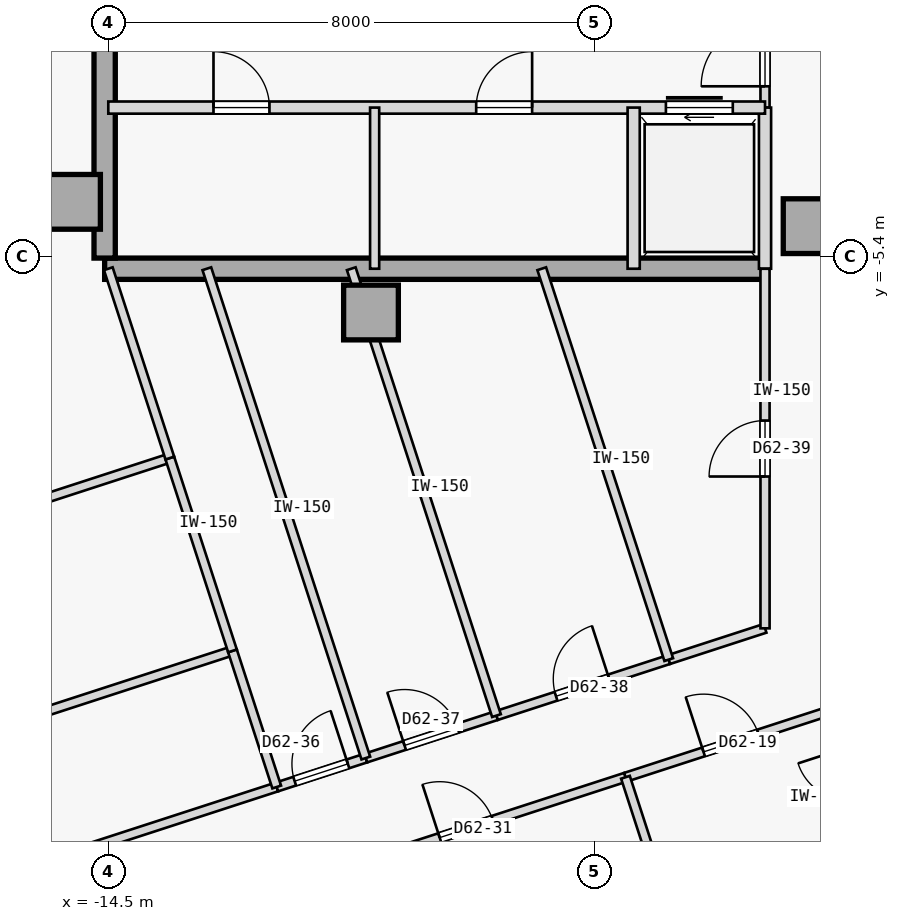
"""IFC4 building model, lengths in metres.
Left out: names, types, materials, properties, quantities, classifications, styles, units other than length and angle.
Written with IfcOpenShell. Run it as: python <this file> out.ifc"""

import sys

from ifc_helpers import new_model, si_unit, direction, frame, frame_2d, origin, origin_2d, place, context, subcontext, project, spatial, rectangle, extrude, element, fill, save


model = new_model("IFC4")
c1 = context("Model", 3, precision=1e-05, world=origin(), true_north=direction((0.0, 1.0)))
c2 = subcontext(c1, "Body", "Model", "MODEL_VIEW")
j1 = project(units=[si_unit("LENGTHUNIT", "METRE"), si_unit("PLANEANGLEUNIT", "RADIAN")], contexts=[c1])
p1 = place(None, origin())
s1 = spatial("IfcSite", under=j1, at=p1, CompositionType="ELEMENT")
p2 = place(p1, origin())
s2 = spatial("IfcBuilding", under=s1, at=p2, CompositionType="ELEMENT")
p3 = place(p2, frame((0.0, 0.0, 234.35)))
s3 = spatial("IfcBuildingStorey", under=s2, at=p3, CompositionType="ELEMENT", Elevation=234.35)
for number, where, z_axis, x_axis in (
    (1, (-15.08, -4.5, 0.0), (0.0, 0.0, 1.0), (1.0, 0.0, 0.0)),
    (2, (-10.18, -6.32, 0.0), (0.0, 0.0, 1.0), (1.0, 0.0, 0.0)),
    (3, (-2.95, -4.9, 0.0), (0.0, 0.0, 1.0), (1.0, 0.0, 0.0)),
):
    element("IfcColumn", number, at=place(p3, frame(where, z_axis=z_axis, x_axis=x_axis)), inside=s3, PredefinedType="COLUMN", context=c2, shape_type="SweptSolid", body=[
        extrude(rectangle(XDim=0.9, YDim=0.9, at=origin_2d()), origin(), (0.0, 0.0, 1.0), 3.35),
    ])
p4 = place(p3, frame((-14.56, -5.6, 0.0), z_axis=(0.0, 0.0, 1.0), x_axis=(1.0, 0.0, 0.0)))
e4 = element("IfcWall", 4, at=p4, inside=s3, PredefinedType="SHEAR", context=c2, shape_type="SweptSolid", body=[
    extrude(rectangle(XDim=10.86, YDim=0.35, at=frame_2d((5.43, 0.0))), origin(), (0.0, 0.0, 1.0), 3.125),
])
p5 = place(p3, frame((-14.56, -5.425, 0.0), z_axis=(0.0, 0.0, 1.0), x_axis=(0.0, 1.0, 0.0)))
e5 = element("IfcWall", 5, at=p5, inside=s3, PredefinedType="SHEAR", context=c2, shape_type="SweptSolid", body=[
    extrude(rectangle(XDim=10.85, YDim=0.35, at=frame_2d((5.425, 0.0))), origin(), (0.0, 0.0, 1.0), 3.125),
])
p6 = place(p3, frame((-3.7, -2.95, 0.0), z_axis=(0.0, 0.0, 1.0), x_axis=(0.0, 1.0, 0.0)))
e6 = element("IfcWall", 6, at=p6, inside=s3, PredefinedType="PARTITIONING", context=c2, shape_type="SweptSolid", body=[
    extrude(rectangle(XDim=1.8, YDim=0.15, at=frame_2d((0.9, 0.0))), origin(), (0.0, 0.0, 1.0), 3.125),
])
p7 = place(p6, frame((0.35, 0.0, 0.0)))
e7 = element("IfcOpeningElement", 7, at=p7, cuts=e6, PredefinedType="OPENING", context=c2, shape_type="SweptSolid", body=[
    extrude(rectangle(XDim=1.05, YDim=2.18, at=frame_2d((0.525, 1.09))), frame((0.0, 0.085, 0.0), z_axis=(0.0, -1.0, 0.0), x_axis=(1.0, 0.0, 0.0)), (0.0, 0.0, 1.0), 0.17),
])
p8 = place(p3, frame((-3.7, -5.6, 0.0), z_axis=(0.0, 0.0, 1.0), x_axis=(0.0, 1.0, 0.0)))
e8 = element("IfcWall", 8, at=p8, inside=s3, PredefinedType="STANDARD", context=c2, shape_type="SweptSolid", body=[
    extrude(rectangle(XDim=2.65, YDim=0.2, at=frame_2d((1.325, 0.0))), origin(), (0.0, 0.0, 1.0), 3.125),
])
p9 = place(p3, frame((-14.5, -2.95, 0.0), z_axis=(0.0, 0.0, 1.0), x_axis=(1.0, 0.0, 0.0)))
e9 = element("IfcWall", 9, at=p9, inside=s3, PredefinedType="STANDARD", context=c2, shape_type="SweptSolid", body=[
    extrude(rectangle(XDim=10.8, YDim=0.2, at=frame_2d((5.4, 0.0))), origin(), (0.0, 0.0, 1.0), 3.125),
])
p10 = place(p9, frame((9.17, 0.0, 0.0)))
e10 = element("IfcOpeningElement", 10, at=p10, cuts=e9, PredefinedType="OPENING", context=c2, shape_type="SweptSolid", body=[
    extrude(rectangle(XDim=1.1, YDim=2.15, at=frame_2d((0.55, 1.075))), frame((0.0, 0.11, 0.0), z_axis=(0.0, -1.0, 0.0), x_axis=(1.0, 0.0, 0.0)), (0.0, 0.0, 1.0), 0.22),
])
p11 = place(p9, frame((1.73, 0.0, 0.0)))
e11 = element("IfcOpeningElement", 11, at=p11, cuts=e9, PredefinedType="OPENING", context=c2, shape_type="SweptSolid", body=[
    extrude(rectangle(XDim=0.92, YDim=2.15, at=frame_2d((0.46, 1.075))), frame((0.0, 0.11, 0.0), z_axis=(0.0, -1.0, 0.0), x_axis=(1.0, 0.0, 0.0)), (0.0, 0.0, 1.0), 0.22),
])
p12 = place(p9, frame((6.05, 0.0, 0.0)))
e12 = element("IfcOpeningElement", 12, at=p12, cuts=e9, PredefinedType="OPENING", context=c2, shape_type="SweptSolid", body=[
    extrude(rectangle(XDim=0.92, YDim=2.15, at=frame_2d((0.46, 1.075))), frame((0.0, 0.11, 0.0), z_axis=(0.0, -1.0, 0.0), x_axis=(1.0, 0.0, 0.0)), (0.0, 0.0, 1.0), 0.22),
])
p13 = place(p3, frame((-5.86, -5.6, 0.0), z_axis=(0.0, 0.0, 1.0), x_axis=(0.0, 1.0, 0.0)))
e13 = element("IfcWall", 13, at=p13, inside=s3, PredefinedType="STANDARD", context=c2, shape_type="SweptSolid", body=[
    extrude(rectangle(XDim=2.65, YDim=0.2, at=frame_2d((1.325, 0.0))), origin(), (0.0, 0.0, 1.0), 3.125),
])
p14 = place(p3, frame((-10.12, -5.6, 0.0), z_axis=(0.0, 0.0, 1.0), x_axis=(0.0, 1.0, 0.0)))
e14 = element("IfcWall", 14, at=p14, inside=s3, PredefinedType="PARTITIONING", context=c2, shape_type="SweptSolid", body=[
    extrude(rectangle(XDim=2.65, YDim=0.15, at=frame_2d((1.325, 0.0))), origin(), (0.0, 0.0, 1.0), 3.125),
])
p15 = place(p3, frame((-5.995, -13.963, 0.0), z_axis=(0.0, 0.0, 1.0), x_axis=(0.951050780541, 0.309034646652, 0.0)))
e15 = element("IfcWall", 15, at=p15, inside=s3, PredefinedType="PARTITIONING", context=c2, shape_type="SweptSolid", body=[
    extrude(rectangle(XDim=3.65, YDim=0.15, at=frame_2d((1.825, 0.0))), origin(), (0.0, 0.0, 1.0), 3.125),
])
p16 = place(p15, frame((1.35, 0.0, 0.0)))
e16 = element("IfcOpeningElement", 16, at=p16, cuts=e15, PredefinedType="OPENING", context=c2, shape_type="SweptSolid", body=[
    extrude(rectangle(XDim=0.95, YDim=2.15, at=frame_2d((0.475, 1.075))), frame((0.0, 0.085, 0.0), z_axis=(0.0, -1.0, 0.0), x_axis=(1.0, 0.0, 0.0)), (0.0, 0.0, 1.0), 0.17),
])
p17 = place(p3, frame((-29.45, -19.881, 0.0), z_axis=(0.0, 0.0, 1.0), x_axis=(0.95105650271, 0.309017036186, 0.0)))
e17 = element("IfcWall", 17, at=p17, inside=s3, PredefinedType="PARTITIONING", context=c2, shape_type="SweptSolid", body=[
    extrude(rectangle(XDim=18.632, YDim=0.15, at=frame_2d((9.316, 0.0))), origin(), (0.0, 0.0, 1.0), 3.125),
])
p18 = place(p17, frame((8.856, 0.0, 0.0)))
e18 = element("IfcOpeningElement", 18, at=p18, cuts=e17, PredefinedType="OPENING", context=c2, shape_type="SweptSolid", body=[
    extrude(rectangle(XDim=0.92, YDim=2.15, at=frame_2d((0.46, 1.075))), frame((0.0, 0.085, 0.0), z_axis=(0.0, -1.0, 0.0), x_axis=(1.0, 0.0, 0.0)), (0.0, 0.0, 1.0), 0.17),
])
p19 = place(p3, frame((-11.23, -15.664, 0.0), z_axis=(0.0, 0.0, 1.0), x_axis=(0.951055579382, 0.309019877882, 0.0)))
e19 = element("IfcWall", 19, at=p19, inside=s3, PredefinedType="PARTITIONING", context=c2, shape_type="SweptSolid", body=[
    extrude(rectangle(XDim=5.504, YDim=0.15, at=frame_2d((2.752, 0.0))), origin(), (0.0, 0.0, 1.0), 3.125),
])
p20 = place(p19, frame((2.292, 0.0, 0.0)))
e20 = element("IfcOpeningElement", 20, at=p20, cuts=e19, PredefinedType="OPENING", context=c2, shape_type="SweptSolid", body=[
    extrude(rectangle(XDim=0.92, YDim=2.15, at=frame_2d((0.46, 1.075))), frame((0.0, 0.085, 0.0), z_axis=(0.0, -1.0, 0.0), x_axis=(1.0, 0.0, 0.0)), (0.0, 0.0, 1.0), 0.17),
])
p21 = place(p3, frame((-11.73, -14.123, 0.0), z_axis=(0.0, 0.0, 1.0), x_axis=(0.951032904484, 0.309089654614, 0.0)))
e21 = element("IfcWall", 21, at=p21, inside=s3, PredefinedType="PARTITIONING", context=c2, shape_type="SweptSolid", body=[
    extrude(rectangle(XDim=1.541, YDim=0.15, at=frame_2d((0.771, 0.0))), origin(), (0.0, 0.0, 1.0), 3.125),
])
p22 = place(p21, frame((0.311, 0.0, 0.0)))
e22 = element("IfcOpeningElement", 22, at=p22, cuts=e21, PredefinedType="OPENING", context=c2, shape_type="SweptSolid", body=[
    extrude(rectangle(XDim=0.92, YDim=2.15, at=frame_2d((0.46, 1.075))), frame((0.0, 0.085, 0.0), z_axis=(0.0, -1.0, 0.0), x_axis=(1.0, 0.0, 0.0)), (0.0, 0.0, 1.0), 0.17),
])
p23 = place(p3, frame((-10.265, -13.647, 0.0), z_axis=(0.0, 0.0, 1.0), x_axis=(0.951065832698, 0.308988319964, 0.0)))
e23 = element("IfcWall", 23, at=p23, inside=s3, PredefinedType="PARTITIONING", context=c2, shape_type="SweptSolid", body=[
    extrude(rectangle(XDim=2.259, YDim=0.15, at=frame_2d((1.129, 0.0))), origin(), (0.0, 0.0, 1.0), 3.125),
])
p24 = place(p23, frame((0.669, 0.0, 0.0)))
e24 = element("IfcOpeningElement", 24, at=p24, cuts=e23, PredefinedType="OPENING", context=c2, shape_type="SweptSolid", body=[
    extrude(rectangle(XDim=0.92, YDim=2.15, at=frame_2d((0.46, 1.075))), frame((0.0, 0.085, 0.0), z_axis=(0.0, -1.0, 0.0), x_axis=(1.0, 0.0, 0.0)), (0.0, 0.0, 1.0), 0.17),
])
p25 = place(p3, frame((-8.116, -12.949, 0.0), z_axis=(0.0, 0.0, 1.0), x_axis=(0.95107320803, 0.308965617775, 0.0)))
e25 = element("IfcWall", 25, at=p25, inside=s3, PredefinedType="PARTITIONING", context=c2, shape_type="SweptSolid", body=[
    extrude(rectangle(XDim=2.979, YDim=0.15, at=frame_2d((1.49, 0.0))), origin(), (0.0, 0.0, 1.0), 3.125),
])
p26 = place(p25, frame((1.03, 0.0, 0.0)))
e26 = element("IfcOpeningElement", 26, at=p26, cuts=e25, PredefinedType="OPENING", context=c2, shape_type="SweptSolid", body=[
    extrude(rectangle(XDim=0.92, YDim=2.15, at=frame_2d((0.46, 1.075))), frame((0.0, 0.085, 0.0), z_axis=(0.0, -1.0, 0.0), x_axis=(1.0, 0.0, 0.0)), (0.0, 0.0, 1.0), 0.17),
])
p27 = place(p3, frame((-5.283, -12.028, 0.0), z_axis=(0.0, 0.0, 1.0), x_axis=(0.951031913627, 0.309092703349, 0.0)))
e27 = element("IfcWall", 27, at=p27, inside=s3, PredefinedType="PARTITIONING", context=c2, shape_type="SweptSolid", body=[
    extrude(rectangle(XDim=1.665, YDim=0.15, at=frame_2d((0.833, 0.0))), origin(), (0.0, 0.0, 1.0), 3.125),
])
p28 = place(p3, frame((-3.7, -11.514, 0.0), z_axis=(0.0, 0.0, 1.0), x_axis=(-8.2572974e-05, 0.999999996591, 0.0)))
e28 = element("IfcWall", 28, at=p28, inside=s3, PredefinedType="PARTITIONING", context=c2, shape_type="SweptSolid", body=[
    extrude(rectangle(XDim=5.913, YDim=0.15, at=frame_2d((2.957, 0.0))), origin(), (0.0, 0.0, 1.0), 3.125),
])
p29 = place(p28, frame((2.497, 0.0, 0.0)))
e29 = element("IfcOpeningElement", 29, at=p29, cuts=e28, PredefinedType="OPENING", context=c2, shape_type="SweptSolid", body=[
    extrude(rectangle(XDim=0.92, YDim=2.15, at=frame_2d((0.46, 1.075))), frame((0.0, 0.085, 0.0), z_axis=(0.0, -1.0, 0.0), x_axis=(1.0, 0.0, 0.0)), (0.0, 0.0, 1.0), 0.17),
])
p30 = place(p3, frame((-4.972, -17.113, 0.0), z_axis=(0.0, 0.0, 1.0), x_axis=(-0.309009398695, 0.951058984248, 0.0)))
e30 = element("IfcWall", 30, at=p30, inside=s3, PredefinedType="PARTITIONING", context=c2, shape_type="SweptSolid", body=[
    extrude(rectangle(XDim=3.312, YDim=0.15, at=frame_2d((1.656, 0.0))), origin(), (0.0, 0.0, 1.0), 3.125),
])
p31 = place(p3, frame((-30.178, -17.642, 0.0), z_axis=(0.0, 0.0, 1.0), x_axis=(0.95105650271, 0.309017036186, 0.0)))
e31 = element("IfcWall", 31, at=p31, inside=s3, PredefinedType="PARTITIONING", context=c2, shape_type="SweptSolid", body=[
    extrude(rectangle(XDim=18.632, YDim=0.15, at=frame_2d((9.316, 0.0))), origin(), (0.0, 0.0, 1.0), 3.125),
])
p32 = place(p31, frame((8.856, 0.0, 0.0)))
e32 = element("IfcOpeningElement", 32, at=p32, cuts=e31, PredefinedType="OPENING", context=c2, shape_type="SweptSolid", body=[
    extrude(rectangle(XDim=0.92, YDim=2.15, at=frame_2d((0.46, 1.075))), frame((0.0, 0.085, 0.0), z_axis=(0.0, -1.0, 0.0), x_axis=(1.0, 0.0, 0.0)), (0.0, 0.0, 1.0), 0.17),
])
p33 = place(p3, frame((-11.73, -14.123, 0.0), z_axis=(0.0, 0.0, 1.0), x_axis=(-0.309062621189, 0.951041690035, 0.0)))
e33 = element("IfcWall", 33, at=p33, inside=s3, PredefinedType="PARTITIONING", context=c2, shape_type="SweptSolid", body=[
    extrude(rectangle(XDim=2.354, YDim=0.15, at=frame_2d((1.177, 0.0))), origin(), (0.0, 0.0, 1.0), 3.125),
])
p34 = place(p3, frame((-31.208, -14.471, 0.0), z_axis=(0.0, 0.0, 1.0), x_axis=(0.951057753948, 0.309013185244, 0.0)))
e34 = element("IfcWall", 34, at=p34, inside=s3, PredefinedType="PARTITIONING", context=c2, shape_type="SweptSolid", body=[
    extrude(rectangle(XDim=18.632, YDim=0.15, at=frame_2d((9.316, 0.0))), origin(), (0.0, 0.0, 1.0), 3.125),
])
p35 = place(p3, frame((-12.458, -11.884, 0.0), z_axis=(0.0, 0.0, 1.0), x_axis=(-0.308946982245, 0.951079261766, 0.0)))
e35 = element("IfcWall", 35, at=p35, inside=s3, PredefinedType="PARTITIONING", context=c2, shape_type="SweptSolid", body=[
    extrude(rectangle(XDim=3.334, YDim=0.15, at=frame_2d((1.667, 0.0))), origin(), (0.0, 0.0, 1.0), 3.125),
])
p36 = place(p3, frame((-30.663, -9.757, 0.0), z_axis=(0.0, 0.0, 1.0), x_axis=(0.951058192995, 0.309011833974, 0.0)))
e36 = element("IfcWall", 36, at=p36, inside=s3, PredefinedType="PARTITIONING", context=c2, shape_type="SweptSolid", body=[
    extrude(rectangle(XDim=16.657, YDim=0.15, at=frame_2d((8.329, 0.0))), origin(), (0.0, 0.0, 1.0), 3.125),
])
p37 = place(p3, frame((-13.488, -8.713, 0.0), z_axis=(0.0, 0.0, 1.0), x_axis=(-0.309082700143, 0.951035164687, 0.0)))
e37 = element("IfcWall", 37, at=p37, inside=s3, PredefinedType="PARTITIONING", context=c2, shape_type="SweptSolid", body=[
    extrude(rectangle(XDim=3.274, YDim=0.15, at=frame_2d((1.637, 0.0))), origin(), (0.0, 0.0, 1.0), 3.125),
])
p38 = place(p3, frame((-10.265, -13.647, 0.0), z_axis=(0.0, 0.0, 1.0), x_axis=(-0.309007776314, 0.951059511375, 0.0)))
e38 = element("IfcWall", 38, at=p38, inside=s3, PredefinedType="PARTITIONING", context=c2, shape_type="SweptSolid", body=[
    extrude(rectangle(XDim=8.461, YDim=0.15, at=frame_2d((4.23, 0.0))), origin(), (0.0, 0.0, 1.0), 3.125),
])
p39 = place(p3, frame((-8.116, -12.949, 0.0), z_axis=(0.0, 0.0, 1.0), x_axis=(-0.309005340707, 0.951060302722, 0.0)))
e39 = element("IfcWall", 39, at=p39, inside=s3, PredefinedType="PARTITIONING", context=c2, shape_type="SweptSolid", body=[
    extrude(rectangle(XDim=7.727, YDim=0.15, at=frame_2d((3.864, 0.0))), origin(), (0.0, 0.0, 1.0), 3.125),
])
p40 = place(p3, frame((-5.283, -12.028, 0.0), z_axis=(0.0, 0.0, 1.0), x_axis=(-0.30901256406, 0.95105795578, 0.0)))
e40 = element("IfcWall", 40, at=p40, inside=s3, PredefinedType="PARTITIONING", context=c2, shape_type="SweptSolid", body=[
    extrude(rectangle(XDim=6.759, YDim=0.15, at=frame_2d((3.379, 0.0))), origin(), (0.0, 0.0, 1.0), 3.125),
])
p41 = place(p7, origin())
e41 = element("IfcDoor", 41, at=p41, inside=s3, OperationType="SINGLE_SWING_LEFT", PredefinedType="DOOR", context=c2, shape_type="SweptSolid", body=[
    extrude(rectangle(XDim=1.05, YDim=2.18, at=frame_2d((0.525, 1.09))), frame((0.0, 0.025, 0.0), z_axis=(0.0, -1.0, 0.0), x_axis=(1.0, 0.0, 0.0)), (0.0, 0.0, 1.0), 0.05),
])
fill(e7, e41)
p42 = place(p10, origin())
e42 = element("IfcDoor", 42, at=p42, inside=s3, OperationType="SLIDING_TO_RIGHT", PredefinedType="DOOR", context=c2, shape_type="SweptSolid", body=[
    extrude(rectangle(XDim=1.1, YDim=2.15, at=frame_2d((0.55, 1.075))), frame((0.0, 0.025, 0.0), z_axis=(0.0, -1.0, 0.0), x_axis=(1.0, 0.0, 0.0)), (0.0, 0.0, 1.0), 0.05),
])
fill(e10, e42)
p43 = place(p11, origin())
e43 = element("IfcDoor", 43, at=p43, inside=s3, OperationType="SINGLE_SWING_LEFT", PredefinedType="DOOR", context=c2, shape_type="SweptSolid", body=[
    extrude(rectangle(XDim=0.92, YDim=2.15, at=frame_2d((0.46, 1.075))), frame((0.0, 0.025, 0.0), z_axis=(0.0, -1.0, 0.0), x_axis=(1.0, 0.0, 0.0)), (0.0, 0.0, 1.0), 0.05),
])
fill(e11, e43)
p44 = place(p12, origin())
e44 = element("IfcDoor", 44, at=p44, inside=s3, OperationType="SINGLE_SWING_RIGHT", PredefinedType="DOOR", context=c2, shape_type="SweptSolid", body=[
    extrude(rectangle(XDim=0.92, YDim=2.15, at=frame_2d((0.46, 1.075))), frame((0.0, 0.025, 0.0), z_axis=(0.0, -1.0, 0.0), x_axis=(1.0, 0.0, 0.0)), (0.0, 0.0, 1.0), 0.05),
])
fill(e12, e44)
p45 = place(p16, origin())
e45 = element("IfcDoor", 45, at=p45, inside=s3, OperationType="SINGLE_SWING_LEFT", PredefinedType="DOOR", context=c2, shape_type="SweptSolid", body=[
    extrude(rectangle(XDim=0.95, YDim=2.15, at=frame_2d((0.475, 1.075))), frame((0.0, 0.025, 0.0), z_axis=(0.0, -1.0, 0.0), x_axis=(1.0, 0.0, 0.0)), (0.0, 0.0, 1.0), 0.05),
])
fill(e16, e45)
p46 = place(p20, origin())
e46 = element("IfcDoor", 46, at=p46, inside=s3, OperationType="SINGLE_SWING_LEFT", PredefinedType="DOOR", context=c2, shape_type="SweptSolid", body=[
    extrude(rectangle(XDim=0.92, YDim=2.15, at=frame_2d((0.46, 1.075))), frame((0.0, 0.025, 0.0), z_axis=(0.0, -1.0, 0.0), x_axis=(1.0, 0.0, 0.0)), (0.0, 0.0, 1.0), 0.05),
])
fill(e20, e46)
p47 = place(p22, origin())
e47 = element("IfcDoor", 47, at=p47, inside=s3, OperationType="SINGLE_SWING_RIGHT", PredefinedType="DOOR", context=c2, shape_type="SweptSolid", body=[
    extrude(rectangle(XDim=0.92, YDim=2.15, at=frame_2d((0.46, 1.075))), frame((0.0, 0.025, 0.0), z_axis=(0.0, -1.0, 0.0), x_axis=(1.0, 0.0, 0.0)), (0.0, 0.0, 1.0), 0.05),
])
fill(e22, e47)
p48 = place(p24, origin())
e48 = element("IfcDoor", 48, at=p48, inside=s3, OperationType="SINGLE_SWING_LEFT", PredefinedType="DOOR", context=c2, shape_type="SweptSolid", body=[
    extrude(rectangle(XDim=0.92, YDim=2.15, at=frame_2d((0.46, 1.075))), frame((0.0, 0.025, 0.0), z_axis=(0.0, -1.0, 0.0), x_axis=(1.0, 0.0, 0.0)), (0.0, 0.0, 1.0), 0.05),
])
fill(e24, e48)
p49 = place(p26, origin())
e49 = element("IfcDoor", 49, at=p49, inside=s3, OperationType="SINGLE_SWING_RIGHT", PredefinedType="DOOR", context=c2, shape_type="SweptSolid", body=[
    extrude(rectangle(XDim=0.92, YDim=2.15, at=frame_2d((0.46, 1.075))), frame((0.0, 0.025, 0.0), z_axis=(0.0, -1.0, 0.0), x_axis=(1.0, 0.0, 0.0)), (0.0, 0.0, 1.0), 0.05),
])
fill(e26, e49)
p50 = place(p29, origin())
e50 = element("IfcDoor", 50, at=p50, inside=s3, OperationType="SINGLE_SWING_LEFT", PredefinedType="DOOR", context=c2, shape_type="SweptSolid", body=[
    extrude(rectangle(XDim=0.92, YDim=2.15, at=frame_2d((0.46, 1.075))), frame((0.0, 0.025, 0.0), z_axis=(0.0, -1.0, 0.0), x_axis=(1.0, 0.0, 0.0)), (0.0, 0.0, 1.0), 0.05),
])
fill(e29, e50)
save(model, sys.argv[1])
